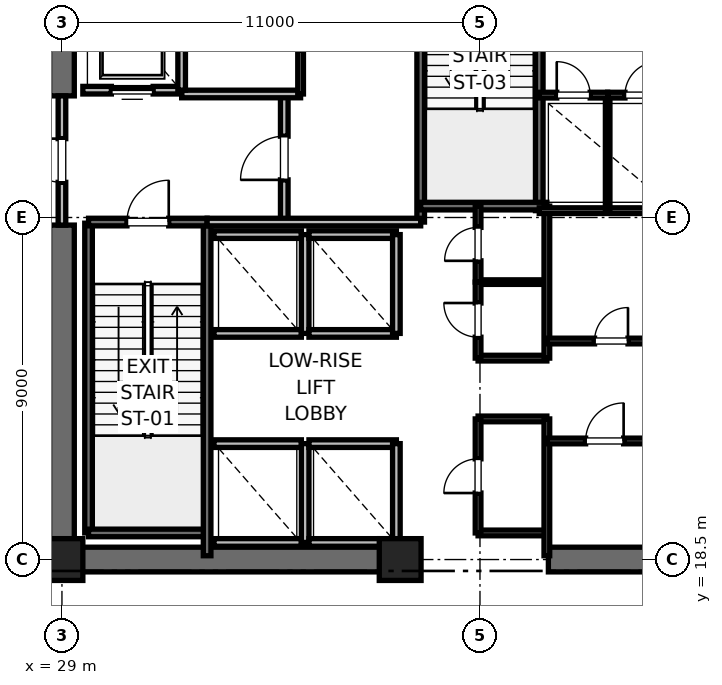
"""IFC4 building model, lengths in metres.
Left out: names, types, materials, properties, quantities, classifications, styles, units other than length and angle.
Written with IfcOpenShell. Run it as: python <this file> out.ifc"""

import sys

from ifc_helpers import new_model, si_unit, direction, frame, frame_2d, origin, origin_2d, place, context, subcontext, project, spatial, rectangle, extrude, element, fill, save


model = new_model("IFC4")
c1 = context("Model", 3, precision=1e-05, world=origin(), true_north=direction((0.0, 1.0)))
c2 = subcontext(c1, "Body", "Model", "MODEL_VIEW")
j1 = project(units=[si_unit("LENGTHUNIT", "METRE"), si_unit("PLANEANGLEUNIT", "RADIAN")], contexts=[c1])
p1 = place(None, origin())
s1 = spatial("IfcSite", under=j1, at=p1, CompositionType="ELEMENT")
p2 = place(p1, origin())
s2 = spatial("IfcBuilding", under=s1, at=p2, CompositionType="ELEMENT")
p3 = place(p2, frame((0.0, 0.0, 6.0)))
s3 = spatial("IfcBuildingStorey", under=s2, at=p3, CompositionType="ELEMENT", Elevation=6.0)
for number, where, z_axis, x_axis in (
    (1, (29.0, 18.5, 0.0), (0.0, 0.0, 1.0), (1.0, 0.0, 0.0)),
    (2, (37.9, 18.5, 0.0), (0.0, 0.0, 1.0), (1.0, 0.0, 0.0)),
):
    element("IfcColumn", number, at=place(p3, frame(where, z_axis=z_axis, x_axis=x_axis)), inside=s3, PredefinedType="PILASTER", context=c2, shape_type="SweptSolid", body=[
        extrude(rectangle(XDim=1.1, YDim=1.1, at=origin_2d()), origin(), (0.0, 0.0, 1.0), 5.2),
    ])
for number, where, z_axis, x_axis in (
    (3, (29.0, 18.5, 0.0), (0.0, 0.0, 1.0), (1.0, 0.0, 0.0)),
    (4, (41.8, 18.5, 0.0), (0.0, 0.0, 1.0), (1.0, 0.0, 0.0)),
):
    element("IfcWall", number, at=place(p3, frame(where, z_axis=z_axis, x_axis=x_axis)), inside=s3, PredefinedType="SHEAR", context=c2, shape_type="SweptSolid", body=[
        extrude(rectangle(XDim=9.2, YDim=0.65, at=frame_2d((4.6, 0.0))), origin(), (0.0, 0.0, 1.0), 4.92),
    ])
p4 = place(p3, frame((29.0, 18.5, 0.0), z_axis=(0.0, 0.0, 1.0), x_axis=(0.0, 1.0, 0.0)))
e5 = element("IfcWall", 5, at=p4, inside=s3, PredefinedType="SHEAR", context=c2, shape_type="SweptSolid", body=[
    extrude(rectangle(XDim=8.8, YDim=0.65, at=frame_2d((4.4, 0.0))), origin(), (0.0, 0.0, 1.0), 4.92),
])
p5 = place(p3, frame((29.0, 30.7, 0.0), z_axis=(0.0, 0.0, 1.0), x_axis=(0.0, 1.0, 0.0)))
e6 = element("IfcWall", 6, at=p5, inside=s3, PredefinedType="SHEAR", context=c2, shape_type="SweptSolid", body=[
    extrude(rectangle(XDim=5.8, YDim=0.65, at=frame_2d((2.9, 0.0))), origin(), (0.0, 0.0, 1.0), 4.92),
])
p6 = place(p3, frame((29.7, 19.2, 0.0), z_axis=(0.0, 0.0, 1.0), x_axis=(0.0, 1.0, 0.0)))
e7 = element("IfcWall", 7, at=p6, inside=s3, PredefinedType="SOLIDWALL", context=c2, shape_type="SweptSolid", body=[
    extrude(rectangle(XDim=8.15, YDim=0.2, at=frame_2d((4.075, 0.0))), origin(), (0.0, 0.0, 1.0), 4.92),
])
p7 = place(p3, frame((29.7, 19.2, 0.0), z_axis=(0.0, 0.0, 1.0), x_axis=(1.0, 0.0, 0.0)))
e8 = element("IfcWall", 8, at=p7, inside=s3, PredefinedType="SOLIDWALL", context=c2, shape_type="SweptSolid", body=[
    extrude(rectangle(XDim=3.12, YDim=0.2, at=frame_2d((1.56, 0.0))), origin(), (0.0, 0.0, 1.0), 4.92),
])
p8 = place(p3, frame((32.82, 18.6, 0.0), z_axis=(0.0, 0.0, 1.0), x_axis=(0.0, 1.0, 0.0)))
e9 = element("IfcWall", 9, at=p8, inside=s3, PredefinedType="SOLIDWALL", context=c2, shape_type="SweptSolid", body=[
    extrude(rectangle(XDim=8.78, YDim=0.2, at=frame_2d((4.39, 0.0))), origin(), (0.0, 0.0, 1.0), 4.92),
])
p9 = place(p3, frame((29.7, 27.38, 0.0), z_axis=(0.0, 0.0, 1.0), x_axis=(1.0, 0.0, 0.0)))
e10 = element("IfcWall", 10, at=p9, inside=s3, PredefinedType="SOLIDWALL", context=c2, shape_type="SweptSolid", body=[
    extrude(rectangle(XDim=3.12, YDim=0.2, at=frame_2d((1.56, 0.0))), origin(), (0.0, 0.0, 1.0), 4.92),
])
p10 = place(p9, frame((1.01, 0.0, 0.0)))
e11 = element("IfcOpeningElement", 11, at=p10, cuts=e10, PredefinedType="OPENING", context=c2, shape_type="SweptSolid", body=[
    extrude(rectangle(XDim=1.1, YDim=2.15, at=frame_2d((0.55, 1.075))), frame((0.0, 0.1, 0.0), z_axis=(0.0, -1.0, 0.0), x_axis=(1.0, 0.0, 0.0)), (0.0, 0.0, 1.0), 0.2),
])
p11 = place(p3, frame((38.44, 27.38, 0.0), z_axis=(0.0, 0.0, 1.0), x_axis=(0.0, 1.0, 0.0)))
e12 = element("IfcWall", 12, at=p11, inside=s3, PredefinedType="SOLIDWALL", context=c2, shape_type="SweptSolid", body=[
    extrude(rectangle(XDim=8.87, YDim=0.2, at=frame_2d((4.435, 0.0))), origin(), (0.0, 0.0, 1.0), 4.92),
])
p12 = place(p3, frame((41.56, 27.68, 0.0), z_axis=(0.0, 0.0, 1.0), x_axis=(0.0, 1.0, 0.0)))
e13 = element("IfcWall", 13, at=p12, inside=s3, PredefinedType="SOLIDWALL", context=c2, shape_type="SweptSolid", body=[
    extrude(rectangle(XDim=8.57, YDim=0.2, at=frame_2d((4.285, 0.0))), origin(), (0.0, 0.0, 1.0), 4.92),
])
p13 = place(p3, frame((38.44, 27.8, 0.0), z_axis=(0.0, 0.0, 1.0), x_axis=(1.0, 0.0, 0.0)))
e14 = element("IfcWall", 14, at=p13, inside=s3, PredefinedType="SOLIDWALL", context=c2, shape_type="SweptSolid", body=[
    extrude(rectangle(XDim=3.32, YDim=0.2, at=frame_2d((1.66, 0.0))), origin(), (0.0, 0.0, 1.0), 4.92),
])
p14 = place(p3, frame((34.85, 27.38, 0.0), z_axis=(0.0, 0.0, 1.0), x_axis=(0.0, 1.0, 0.0)))
e15 = element("IfcWall", 15, at=p14, inside=s3, PredefinedType="PARTITIONING", context=c2, shape_type="SweptSolid", body=[
    extrude(rectangle(XDim=3.37, YDim=0.2, at=frame_2d((1.685, 0.0))), origin(), (0.0, 0.0, 1.0), 4.92),
])
p15 = place(p14, frame((1.11, 0.0, 0.0)))
e16 = element("IfcOpeningElement", 16, at=p15, cuts=e15, PredefinedType="OPENING", context=c2, shape_type="SweptSolid", body=[
    extrude(rectangle(XDim=1.15, YDim=2.2, at=frame_2d((0.575, 1.1))), frame((0.0, 0.1, 0.0), z_axis=(0.0, -1.0, 0.0), x_axis=(1.0, 0.0, 0.0)), (0.0, 0.0, 1.0), 0.2),
])
p16 = place(p3, frame((29.0, 27.3, 0.0), z_axis=(0.0, 0.0, 1.0), x_axis=(0.0, 1.0, 0.0)))
e17 = element("IfcWall", 17, at=p16, inside=s3, PredefinedType="PARTITIONING", context=c2, shape_type="SweptSolid", body=[
    extrude(rectangle(XDim=3.4, YDim=0.2, at=frame_2d((1.7, 0.0))), origin(), (0.0, 0.0, 1.0), 3.7),
])
p17 = place(p16, frame((1.125, 0.0, 0.0)))
e18 = element("IfcOpeningElement", 18, at=p17, cuts=e17, PredefinedType="OPENING", context=c2, shape_type="SweptSolid", body=[
    extrude(rectangle(XDim=1.15, YDim=2.2, at=frame_2d((0.575, 1.1))), frame((0.0, 0.1, 0.0), z_axis=(0.0, -1.0, 0.0), x_axis=(1.0, 0.0, 0.0)), (0.0, 0.0, 1.0), 0.2),
])
p18 = place(p3, frame((32.82, 27.38, 0.0), z_axis=(0.0, 0.0, 1.0), x_axis=(1.0, 0.0, 0.0)))
e19 = element("IfcWall", 19, at=p18, inside=s3, PredefinedType="PARTITIONING", context=c2, shape_type="SweptSolid", body=[
    extrude(rectangle(XDim=5.62, YDim=0.2, at=frame_2d((2.81, 0.0))), origin(), (0.0, 0.0, 1.0), 4.92),
])
p19 = place(p3, frame((32.15, 30.75, 0.0), z_axis=(0.0, 0.0, 1.0), x_axis=(1.0, 0.0, 0.0)))
e20 = element("IfcWall", 20, at=p19, inside=s3, PredefinedType="PARTITIONING", context=c2, shape_type="SweptSolid", body=[
    extrude(rectangle(XDim=3.13, YDim=0.2, at=frame_2d((1.565, 0.0))), origin(), (0.0, 0.0, 1.0), 4.92),
])
p20 = place(p3, frame((29.55, 30.85, 0.0), z_axis=(0.0, 0.0, 1.0), x_axis=(1.0, 0.0, 0.0)))
e21 = element("IfcWall", 21, at=p20, inside=s3, PredefinedType="SOLIDWALL", context=c2, shape_type="SweptSolid", body=[
    extrude(rectangle(XDim=2.6, YDim=0.2, at=frame_2d((1.3, 0.0))), origin(), (0.0, 0.0, 1.0), 3.7),
])
p21 = place(p20, frame((0.75, 0.0, 0.0)))
e22 = element("IfcOpeningElement", 22, at=p21, cuts=e21, PredefinedType="OPENING", context=c2, shape_type="SweptSolid", body=[
    extrude(rectangle(XDim=1.1, YDim=2.2, at=frame_2d((0.55, 1.1))), frame((0.0, 0.1, 0.0), z_axis=(0.0, -1.0, 0.0), x_axis=(1.0, 0.0, 0.0)), (0.0, 0.0, 1.0), 0.2),
])
p22 = place(p3, frame((32.15, 30.85, 0.0), z_axis=(0.0, 0.0, 1.0), x_axis=(0.0, 1.0, 0.0)))
e23 = element("IfcWall", 23, at=p22, inside=s3, PredefinedType="SOLIDWALL", context=c2, shape_type="SweptSolid", body=[
    extrude(rectangle(XDim=3.0, YDim=0.2, at=frame_2d((1.5, 0.0))), origin(), (0.0, 0.0, 1.0), 4.92),
])
for number, where, z_axis, x_axis in (
    (24, (33.0, 18.95, 0.0), (0.0, 0.0, 1.0), (1.0, 0.0, 0.0)),
    (25, (35.3, 21.55, 0.0), (0.0, 0.0, 1.0), (-1.0, 0.0, 0.0)),
):
    element("IfcWall", number, at=place(p3, frame(where, z_axis=z_axis, x_axis=x_axis)), inside=s3, PredefinedType="SOLIDWALL", context=c2, shape_type="SweptSolid", body=[
        extrude(rectangle(XDim=2.3, YDim=0.2, at=frame_2d((1.15, 0.0))), origin(), (0.0, 0.0, 1.0), 4.92),
    ])
p23 = place(p3, frame((35.4, 18.95, 0.0), z_axis=(0.0, 0.0, 1.0), x_axis=(0.0, 1.0, 0.0)))
e26 = element("IfcWall", 26, at=p23, inside=s3, PredefinedType="SOLIDWALL", context=c2, shape_type="SweptSolid", body=[
    extrude(rectangle(XDim=2.6, YDim=0.2, at=frame_2d((1.3, 0.0))), origin(), (0.0, 0.0, 1.0), 4.92),
])
p24 = place(p3, frame((35.5, 18.95, 0.0), z_axis=(0.0, 0.0, 1.0), x_axis=(1.0, 0.0, 0.0)))
e27 = element("IfcWall", 27, at=p24, inside=s3, PredefinedType="SOLIDWALL", context=c2, shape_type="SweptSolid", body=[
    extrude(rectangle(XDim=2.3, YDim=0.2, at=frame_2d((1.15, 0.0))), origin(), (0.0, 0.0, 1.0), 3.7),
])
p25 = place(p3, frame((37.8, 21.55, 0.0), z_axis=(0.0, 0.0, 1.0), x_axis=(-1.0, 0.0, 0.0)))
e28 = element("IfcWall", 28, at=p25, inside=s3, PredefinedType="SOLIDWALL", context=c2, shape_type="SweptSolid", body=[
    extrude(rectangle(XDim=2.3, YDim=0.2, at=frame_2d((1.15, 0.0))), origin(), (0.0, 0.0, 1.0), 4.92),
])
p26 = place(p3, frame((37.8, 18.95, 0.0), z_axis=(0.0, 0.0, 1.0), x_axis=(0.0, 1.0, 0.0)))
e29 = element("IfcWall", 29, at=p26, inside=s3, PredefinedType="SOLIDWALL", context=c2, shape_type="SweptSolid", body=[
    extrude(rectangle(XDim=2.6, YDim=0.2, at=frame_2d((1.3, 0.0))), origin(), (0.0, 0.0, 1.0), 3.7),
])
for number, where, z_axis, x_axis in (
    (30, (33.0, 24.45, 0.0), (0.0, 0.0, 1.0), (1.0, 0.0, 0.0)),
    (31, (35.3, 27.05, 0.0), (0.0, 0.0, 1.0), (-1.0, 0.0, 0.0)),
):
    element("IfcWall", number, at=place(p3, frame(where, z_axis=z_axis, x_axis=x_axis)), inside=s3, PredefinedType="SOLIDWALL", context=c2, shape_type="SweptSolid", body=[
        extrude(rectangle(XDim=2.3, YDim=0.2, at=frame_2d((1.15, 0.0))), origin(), (0.0, 0.0, 1.0), 4.92),
    ])
p27 = place(p3, frame((35.4, 24.45, 0.0), z_axis=(0.0, 0.0, 1.0), x_axis=(0.0, 1.0, 0.0)))
e32 = element("IfcWall", 32, at=p27, inside=s3, PredefinedType="SOLIDWALL", context=c2, shape_type="SweptSolid", body=[
    extrude(rectangle(XDim=2.6, YDim=0.2, at=frame_2d((1.3, 0.0))), origin(), (0.0, 0.0, 1.0), 4.92),
])
for number, where, z_axis, x_axis in (
    (33, (35.5, 24.45, 0.0), (0.0, 0.0, 1.0), (1.0, 0.0, 0.0)),
    (34, (37.8, 27.05, 0.0), (0.0, 0.0, 1.0), (-1.0, 0.0, 0.0)),
):
    element("IfcWall", number, at=place(p3, frame(where, z_axis=z_axis, x_axis=x_axis)), inside=s3, PredefinedType="SOLIDWALL", context=c2, shape_type="SweptSolid", body=[
        extrude(rectangle(XDim=2.3, YDim=0.2, at=frame_2d((1.15, 0.0))), origin(), (0.0, 0.0, 1.0), 4.92),
    ])
p28 = place(p3, frame((37.8, 24.45, 0.0), z_axis=(0.0, 0.0, 1.0), x_axis=(0.0, 1.0, 0.0)))
e35 = element("IfcWall", 35, at=p28, inside=s3, PredefinedType="SOLIDWALL", context=c2, shape_type="SweptSolid", body=[
    extrude(rectangle(XDim=2.6, YDim=0.2, at=frame_2d((1.3, 0.0))), origin(), (0.0, 0.0, 1.0), 4.92),
])
for number, where, z_axis, x_axis in (
    (36, (39.95, 19.2, 0.0), (0.0, 0.0, 1.0), (1.0, 0.0, 0.0)),
    (37, (39.95, 22.2, 0.0), (0.0, 0.0, 1.0), (1.0, 0.0, 0.0)),
    (38, (39.95, 23.8, 0.0), (0.0, 0.0, 1.0), (1.0, 0.0, 0.0)),
):
    element("IfcWall", number, at=place(p3, frame(where, z_axis=z_axis, x_axis=x_axis)), inside=s3, PredefinedType="PARTITIONING", context=c2, shape_type="SweptSolid", body=[
        extrude(rectangle(XDim=1.81, YDim=0.15, at=frame_2d((0.905, 0.0))), origin(), (0.0, 0.0, 1.0), 2.85),
    ])
p29 = place(p3, frame((39.95, 25.8, 0.0), z_axis=(0.0, 0.0, 1.0), x_axis=(1.0, 0.0, 0.0)))
e39 = element("IfcWall", 39, at=p29, inside=s3, PredefinedType="PARTITIONING", context=c2, shape_type="SweptSolid", body=[
    extrude(rectangle(XDim=1.81, YDim=0.12, at=frame_2d((0.905, 0.0))), origin(), (0.0, 0.0, 1.0), 2.85),
])
p30 = place(p3, frame((41.76, 18.6, 0.0), z_axis=(0.0, 0.0, 1.0), x_axis=(0.0, 1.0, 0.0)))
e40 = element("IfcWall", 40, at=p30, inside=s3, PredefinedType="PARTITIONING", context=c2, shape_type="SweptSolid", body=[
    extrude(rectangle(XDim=3.6, YDim=0.15, at=frame_2d((1.8, 0.0))), origin(), (0.0, 0.0, 1.0), 2.85),
])
p31 = place(p3, frame((41.76, 23.8, 0.0), z_axis=(0.0, 0.0, 1.0), x_axis=(0.0, 1.0, 0.0)))
e41 = element("IfcWall", 41, at=p31, inside=s3, PredefinedType="PARTITIONING", context=c2, shape_type="SweptSolid", body=[
    extrude(rectangle(XDim=4.0, YDim=0.15, at=frame_2d((2.0, 0.0))), origin(), (0.0, 0.0, 1.0), 2.85),
])
p32 = place(p3, frame((39.95, 19.2, 0.0), z_axis=(0.0, 0.0, 1.0), x_axis=(0.0, 1.0, 0.0)))
e42 = element("IfcWall", 42, at=p32, inside=s3, PredefinedType="PARTITIONING", context=c2, shape_type="SweptSolid", body=[
    extrude(rectangle(XDim=3.0, YDim=0.15, at=frame_2d((1.5, 0.0))), origin(), (0.0, 0.0, 1.0), 2.85),
])
p33 = place(p32, frame((1.05, 0.0, 0.0)))
e43 = element("IfcOpeningElement", 43, at=p33, cuts=e42, PredefinedType="OPENING", context=c2, shape_type="SweptSolid", body=[
    extrude(rectangle(XDim=0.9, YDim=2.1, at=frame_2d((0.45, 1.05))), frame((0.0, 0.075, 0.0), z_axis=(0.0, -1.0, 0.0), x_axis=(1.0, 0.0, 0.0)), (0.0, 0.0, 1.0), 0.15),
])
p34 = place(p3, frame((39.95, 23.8, 0.0), z_axis=(0.0, 0.0, 1.0), x_axis=(0.0, 1.0, 0.0)))
e44 = element("IfcWall", 44, at=p34, inside=s3, PredefinedType="PARTITIONING", context=c2, shape_type="SweptSolid", body=[
    extrude(rectangle(XDim=2.0, YDim=0.15, at=frame_2d((1.0, 0.0))), origin(), (0.0, 0.0, 1.0), 2.85),
])
p35 = place(p34, frame((0.55, 0.0, 0.0)))
e45 = element("IfcOpeningElement", 45, at=p35, cuts=e44, PredefinedType="OPENING", context=c2, shape_type="SweptSolid", body=[
    extrude(rectangle(XDim=0.9, YDim=2.1, at=frame_2d((0.45, 1.05))), frame((0.0, 0.075, 0.0), z_axis=(0.0, -1.0, 0.0), x_axis=(1.0, 0.0, 0.0)), (0.0, 0.0, 1.0), 0.15),
])
p36 = place(p3, frame((39.95, 25.8, 0.0), z_axis=(0.0, 0.0, 1.0), x_axis=(0.0, 1.0, 0.0)))
e46 = element("IfcWall", 46, at=p36, inside=s3, PredefinedType="PARTITIONING", context=c2, shape_type="SweptSolid", body=[
    extrude(rectangle(XDim=2.0, YDim=0.15, at=frame_2d((1.0, 0.0))), origin(), (0.0, 0.0, 1.0), 2.85),
])
p37 = place(p36, frame((0.56, 0.0, 0.0)))
e47 = element("IfcOpeningElement", 47, at=p37, cuts=e46, PredefinedType="OPENING", context=c2, shape_type="SweptSolid", body=[
    extrude(rectangle(XDim=0.88, YDim=2.1, at=frame_2d((0.44, 1.05))), frame((0.0, 0.075, 0.0), z_axis=(0.0, -1.0, 0.0), x_axis=(1.0, 0.0, 0.0)), (0.0, 0.0, 1.0), 0.15),
])
p38 = place(p3, frame((35.28, 30.75, 0.0), z_axis=(0.0, 0.0, 1.0), x_axis=(0.0, 1.0, 0.0)))
e48 = element("IfcWall", 48, at=p38, inside=s3, PredefinedType="PARTITIONING", context=c2, shape_type="SweptSolid", body=[
    extrude(rectangle(XDim=3.2, YDim=0.15, at=frame_2d((1.6, 0.0))), origin(), (0.0, 0.0, 1.0), 2.85),
])
p39 = place(p38, frame((1.15, 0.0, 0.0)))
e49 = element("IfcOpeningElement", 49, at=p39, cuts=e48, PredefinedType="OPENING", context=c2, shape_type="SweptSolid", body=[
    extrude(rectangle(XDim=0.9, YDim=2.1, at=frame_2d((0.45, 1.05))), frame((0.0, 0.075, 0.0), z_axis=(0.0, -1.0, 0.0), x_axis=(1.0, 0.0, 0.0)), (0.0, 0.0, 1.0), 0.15),
])
p40 = place(p3, frame((41.56, 27.68, 0.0), z_axis=(0.0, 0.0, 1.0), x_axis=(1.0, 0.0, 0.0)))
e50 = element("IfcWall", 50, at=p40, inside=s3, PredefinedType="PARTITIONING", context=c2, shape_type="SweptSolid", body=[
    extrude(rectangle(XDim=3.59, YDim=0.15, at=frame_2d((1.795, 0.0))), origin(), (0.0, 0.0, 1.0), 2.85),
])
p41 = place(p3, frame((41.76, 21.62, 0.0), z_axis=(0.0, 0.0, 1.0), x_axis=(1.0, 0.0, 0.0)))
e51 = element("IfcWall", 51, at=p41, inside=s3, PredefinedType="PARTITIONING", context=c2, shape_type="SweptSolid", body=[
    extrude(rectangle(XDim=3.04, YDim=0.15, at=frame_2d((1.52, 0.0))), origin(), (0.0, 0.0, 1.0), 2.85),
])
p42 = place(p41, frame((1.02, 0.0, 0.0)))
e52 = element("IfcOpeningElement", 52, at=p42, cuts=e51, PredefinedType="OPENING", context=c2, shape_type="SweptSolid", body=[
    extrude(rectangle(XDim=1.0, YDim=2.15, at=frame_2d((0.5, 1.075))), frame((0.0, 0.075, 0.0), z_axis=(0.0, -1.0, 0.0), x_axis=(1.0, 0.0, 0.0)), (0.0, 0.0, 1.0), 0.15),
])
p43 = place(p3, frame((41.76, 24.25, 0.0), z_axis=(0.0, 0.0, 1.0), x_axis=(1.0, 0.0, 0.0)))
e53 = element("IfcWall", 53, at=p43, inside=s3, PredefinedType="PARTITIONING", context=c2, shape_type="SweptSolid", body=[
    extrude(rectangle(XDim=3.39, YDim=0.15, at=frame_2d((1.695, 0.0))), origin(), (0.0, 0.0, 1.0), 2.85),
])
p44 = place(p43, frame((1.255, 0.0, 0.0)))
e54 = element("IfcOpeningElement", 54, at=p44, cuts=e53, PredefinedType="OPENING", context=c2, shape_type="SweptSolid", body=[
    extrude(rectangle(XDim=0.88, YDim=2.1, at=frame_2d((0.44, 1.05))), frame((0.0, 0.075, 0.0), z_axis=(0.0, -1.0, 0.0), x_axis=(1.0, 0.0, 0.0)), (0.0, 0.0, 1.0), 0.15),
])
p45 = place(p3, frame((43.36, 27.68, 0.0), z_axis=(0.0, 0.0, 1.0), x_axis=(0.0, 1.0, 0.0)))
e55 = element("IfcWall", 55, at=p45, inside=s3, PredefinedType="PARTITIONING", context=c2, shape_type="SweptSolid", body=[
    extrude(rectangle(XDim=3.04, YDim=0.12, at=frame_2d((1.52, 0.0))), origin(), (0.0, 0.0, 1.0), 2.85),
])
p46 = place(p3, frame((41.56, 30.72, 0.0), z_axis=(0.0, 0.0, 1.0), x_axis=(1.0, 0.0, 0.0)))
e56 = element("IfcWall", 56, at=p46, inside=s3, PredefinedType="PARTITIONING", context=c2, shape_type="SweptSolid", body=[
    extrude(rectangle(XDim=1.8, YDim=0.15, at=frame_2d((0.9, 0.0))), origin(), (0.0, 0.0, 1.0), 2.85),
])
p47 = place(p46, frame((0.46, 0.0, 0.0)))
e57 = element("IfcOpeningElement", 57, at=p47, cuts=e56, PredefinedType="OPENING", context=c2, shape_type="SweptSolid", body=[
    extrude(rectangle(XDim=0.88, YDim=2.1, at=frame_2d((0.44, 1.05))), frame((0.0, 0.075, 0.0), z_axis=(0.0, -1.0, 0.0), x_axis=(1.0, 0.0, 0.0)), (0.0, 0.0, 1.0), 0.15),
])
p48 = place(p3, frame((43.36, 30.72, 0.0), z_axis=(0.0, 0.0, 1.0), x_axis=(1.0, 0.0, 0.0)))
e58 = element("IfcWall", 58, at=p48, inside=s3, PredefinedType="PARTITIONING", context=c2, shape_type="SweptSolid", body=[
    extrude(rectangle(XDim=1.79, YDim=0.15, at=frame_2d((0.895, 0.0))), origin(), (0.0, 0.0, 1.0), 2.85),
])
p49 = place(p48, frame((0.455, 0.0, 0.0)))
e59 = element("IfcOpeningElement", 59, at=p49, cuts=e58, PredefinedType="OPENING", context=c2, shape_type="SweptSolid", body=[
    extrude(rectangle(XDim=0.88, YDim=2.1, at=frame_2d((0.44, 1.05))), frame((0.0, 0.075, 0.0), z_axis=(0.0, -1.0, 0.0), x_axis=(1.0, 0.0, 0.0)), (0.0, 0.0, 1.0), 0.15),
])
p50 = place(p10, origin())
e60 = element("IfcDoor", 60, at=p50, inside=s3, OperationType="SINGLE_SWING_RIGHT", PredefinedType="DOOR", context=c2, shape_type="SweptSolid", body=[
    extrude(rectangle(XDim=1.1, YDim=2.15, at=frame_2d((0.55, 1.075))), frame((0.0, 0.025, 0.0), z_axis=(0.0, -1.0, 0.0), x_axis=(1.0, 0.0, 0.0)), (0.0, 0.0, 1.0), 0.05),
])
fill(e11, e60)
p51 = place(p15, origin())
e61 = element("IfcDoor", 61, at=p51, inside=s3, OperationType="SINGLE_SWING_LEFT", PredefinedType="DOOR", context=c2, shape_type="SweptSolid", body=[
    extrude(rectangle(XDim=1.15, YDim=2.2, at=frame_2d((0.575, 1.1))), frame((0.0, 0.025, 0.0), z_axis=(0.0, -1.0, 0.0), x_axis=(1.0, 0.0, 0.0)), (0.0, 0.0, 1.0), 0.05),
])
fill(e16, e61)
p52 = place(p17, origin())
e62 = element("IfcDoor", 62, at=p52, inside=s3, OperationType="SINGLE_SWING_RIGHT", PredefinedType="DOOR", context=c2, shape_type="SweptSolid", body=[
    extrude(rectangle(XDim=1.15, YDim=2.2, at=frame_2d((0.575, 1.1))), frame((0.0, 0.025, 0.0), z_axis=(0.0, -1.0, 0.0), x_axis=(1.0, 0.0, 0.0)), (0.0, 0.0, 1.0), 0.05),
])
fill(e18, e62)
p53 = place(p21, origin())
e63 = element("IfcDoor", 63, at=p53, inside=s3, OperationType="SLIDING_TO_RIGHT", PredefinedType="DOOR", context=c2, shape_type="SweptSolid", body=[
    extrude(rectangle(XDim=1.1, YDim=2.2, at=frame_2d((0.55, 1.1))), frame((0.0, 0.025, 0.0), z_axis=(0.0, -1.0, 0.0), x_axis=(1.0, 0.0, 0.0)), (0.0, 0.0, 1.0), 0.05),
])
fill(e22, e63)
p54 = place(p33, origin())
e64 = element("IfcDoor", 64, at=p54, inside=s3, OperationType="SINGLE_SWING_LEFT", PredefinedType="DOOR", context=c2, shape_type="SweptSolid", body=[
    extrude(rectangle(XDim=0.9, YDim=2.1, at=frame_2d((0.45, 1.05))), frame((0.0, 0.025, 0.0), z_axis=(0.0, -1.0, 0.0), x_axis=(1.0, 0.0, 0.0)), (0.0, 0.0, 1.0), 0.05),
])
fill(e43, e64)
p55 = place(p35, origin())
e65 = element("IfcDoor", 65, at=p55, inside=s3, OperationType="SINGLE_SWING_RIGHT", PredefinedType="DOOR", context=c2, shape_type="SweptSolid", body=[
    extrude(rectangle(XDim=0.9, YDim=2.1, at=frame_2d((0.45, 1.05))), frame((0.0, 0.025, 0.0), z_axis=(0.0, -1.0, 0.0), x_axis=(1.0, 0.0, 0.0)), (0.0, 0.0, 1.0), 0.05),
])
fill(e45, e65)
p56 = place(p37, origin())
e66 = element("IfcDoor", 66, at=p56, inside=s3, OperationType="SINGLE_SWING_LEFT", PredefinedType="DOOR", context=c2, shape_type="SweptSolid", body=[
    extrude(rectangle(XDim=0.88, YDim=2.1, at=frame_2d((0.44, 1.05))), frame((0.0, 0.025, 0.0), z_axis=(0.0, -1.0, 0.0), x_axis=(1.0, 0.0, 0.0)), (0.0, 0.0, 1.0), 0.05),
])
fill(e47, e66)
p57 = place(p42, origin())
e67 = element("IfcDoor", 67, at=p57, inside=s3, OperationType="SINGLE_SWING_RIGHT", PredefinedType="DOOR", context=c2, shape_type="SweptSolid", body=[
    extrude(rectangle(XDim=1.0, YDim=2.15, at=frame_2d((0.5, 1.075))), frame((0.0, 0.025, 0.0), z_axis=(0.0, -1.0, 0.0), x_axis=(1.0, 0.0, 0.0)), (0.0, 0.0, 1.0), 0.05),
])
fill(e52, e67)
p58 = place(p44, origin())
e68 = element("IfcDoor", 68, at=p58, inside=s3, OperationType="SINGLE_SWING_RIGHT", PredefinedType="DOOR", context=c2, shape_type="SweptSolid", body=[
    extrude(rectangle(XDim=0.88, YDim=2.1, at=frame_2d((0.44, 1.05))), frame((0.0, 0.025, 0.0), z_axis=(0.0, -1.0, 0.0), x_axis=(1.0, 0.0, 0.0)), (0.0, 0.0, 1.0), 0.05),
])
fill(e54, e68)
p59 = place(p47, origin())
e69 = element("IfcDoor", 69, at=p59, inside=s3, OperationType="SINGLE_SWING_LEFT", PredefinedType="DOOR", context=c2, shape_type="SweptSolid", body=[
    extrude(rectangle(XDim=0.88, YDim=2.1, at=frame_2d((0.44, 1.05))), frame((0.0, 0.025, 0.0), z_axis=(0.0, -1.0, 0.0), x_axis=(1.0, 0.0, 0.0)), (0.0, 0.0, 1.0), 0.05),
])
fill(e57, e69)
p60 = place(p49, origin())
e70 = element("IfcDoor", 70, at=p60, inside=s3, OperationType="SINGLE_SWING_RIGHT", PredefinedType="DOOR", context=c2, shape_type="SweptSolid", body=[
    extrude(rectangle(XDim=0.88, YDim=2.1, at=frame_2d((0.44, 1.05))), frame((0.0, 0.025, 0.0), z_axis=(0.0, -1.0, 0.0), x_axis=(1.0, 0.0, 0.0)), (0.0, 0.0, 1.0), 0.05),
])
fill(e59, e70)
save(model, sys.argv[1])
